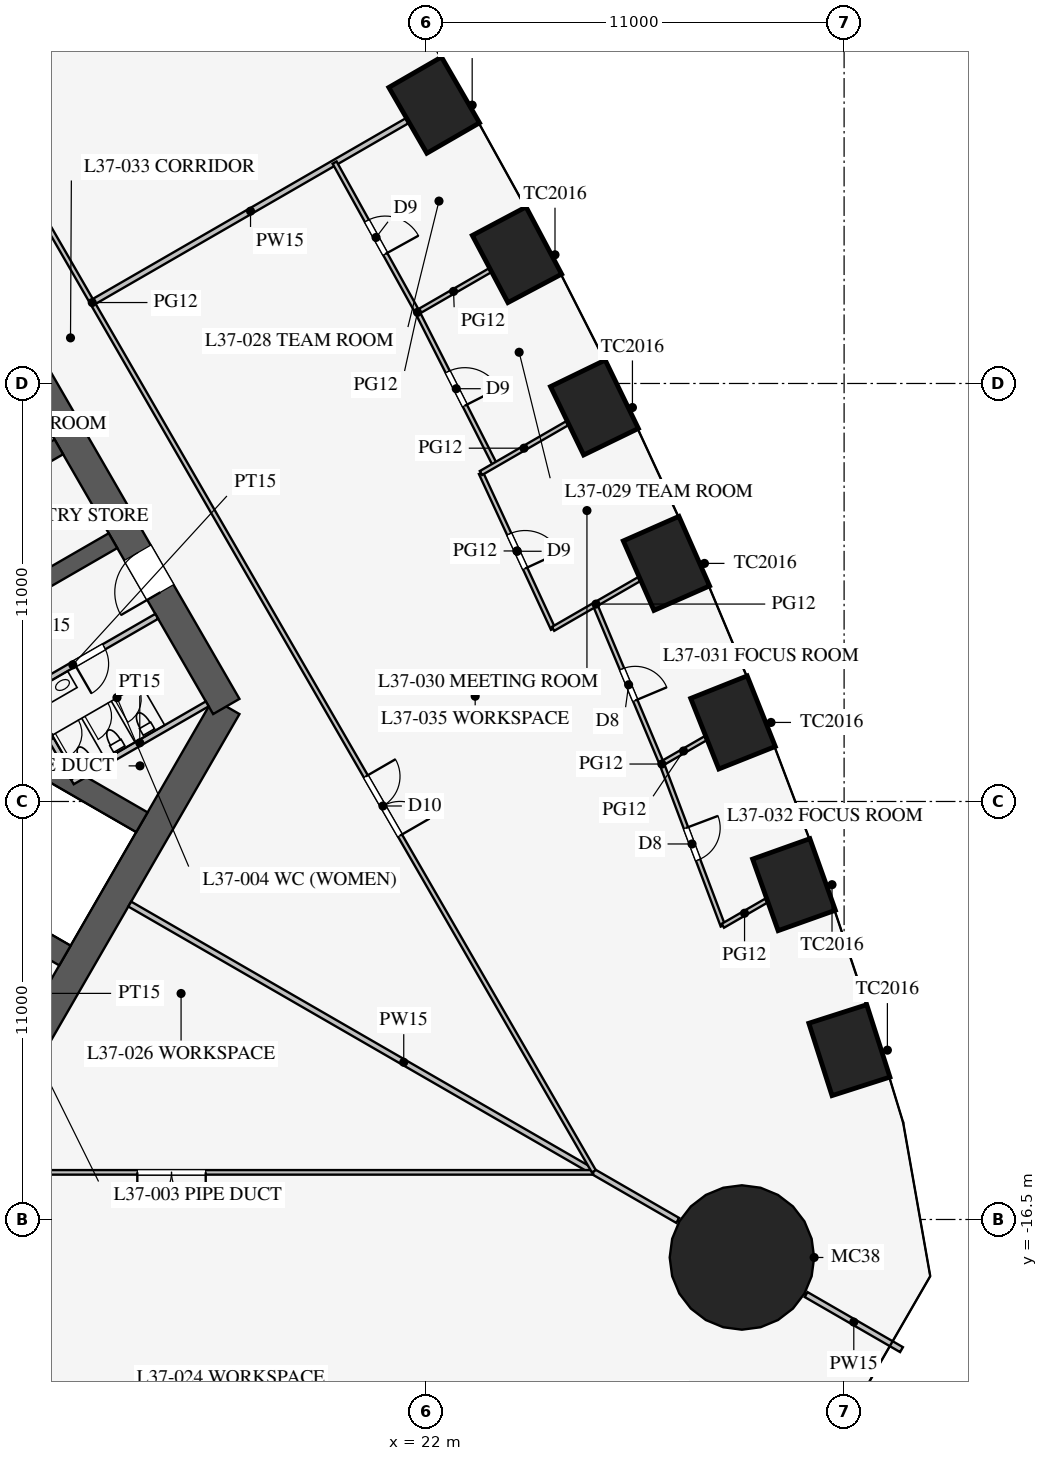
"""IFC4 building model, lengths in metres.
Left out: names, types, materials, properties, quantities, classifications, styles, units other than length and angle.
Written with IfcOpenShell. Run it as: python <this file> out.ifc"""

import sys

from ifc_helpers import new_model, si_unit, direction, frame, frame_2d, origin, origin_2d, place, context, subcontext, project, spatial, rectangle, circle, extrude, element, fill, save


model = new_model("IFC4")
c1 = context("Model", 3, precision=1e-05, world=origin(), true_north=direction((0.0, 1.0)))
c2 = subcontext(c1, "Body", "Model", "MODEL_VIEW")
j1 = project(units=[si_unit("LENGTHUNIT", "METRE"), si_unit("PLANEANGLEUNIT", "RADIAN")], contexts=[c1])
p1 = place(None, origin())
s1 = spatial("IfcSite", under=j1, at=p1, CompositionType="ELEMENT")
p2 = place(p1, origin())
s2 = spatial("IfcBuilding", under=s1, at=p2, CompositionType="ELEMENT")
p3 = place(p2, frame((0.0, 0.0, 161.9)))
s3 = spatial("IfcBuildingStorey", under=s2, at=p3, CompositionType="ELEMENT", Elevation=161.9)
for number, where, z_axis, x_axis in (
    (1, (33.139, -12.044, 0.0), (0.0, 0.0, 1.0), (-0.305, 0.952, 0.0)),
    (2, (31.682, -7.689, 0.0), (0.0, 0.0, 1.0), (-0.336, 0.942, 0.0)),
    (3, (30.077, -3.42, 0.0), (0.0, 0.0, 1.0), (-0.37, 0.929, 0.0)),
    (4, (28.325, 0.765, 0.0), (0.0, 0.0, 1.0), (-0.403, 0.915, 0.0)),
    (5, (26.43, 4.867, 0.0), (0.0, 0.0, 1.0), (-0.436, 0.9, 0.0)),
    (6, (24.393, 8.887, 0.0), (0.0, 0.0, 1.0), (-0.468, 0.883, 0.0)),
    (7, (22.213, 12.825, 0.0), (0.0, 0.0, 1.0), (-0.5, 0.866, 0.0)),
):
    element("IfcColumn", number, at=place(p3, frame(where, z_axis=z_axis, x_axis=x_axis)), inside=s3, PredefinedType="COLUMN", context=c2, shape_type="SweptSolid", body=[
        extrude(rectangle(XDim=2.0, YDim=1.6, at=origin_2d()), origin(), (0.0, 0.0, 1.0), 4.2),
    ])
p4 = place(p3, frame((30.311, -17.5, 0.0), z_axis=(0.0, 0.0, 1.0), x_axis=(1.0, 0.0, 0.0)))
e8 = element("IfcColumn", 8, at=p4, inside=s3, PredefinedType="COLUMN", context=c2, shape_type="SweptSolid", body=[
    extrude(circle(Radius=1.9, at=origin_2d()), origin(), (0.0, 0.0, 1.0), 4.2),
])
p5 = place(p3, frame((10.97, -13.0, 0.0), z_axis=(0.0, 0.0, 1.0), x_axis=(0.499995765644, 0.866027848477, 0.0)))
e9 = element("IfcWall", 9, at=p5, inside=s3, PredefinedType="SHEAR", context=c2, shape_type="SweptSolid", body=[
    extrude(rectangle(XDim=11.547, YDim=0.8, at=frame_2d((5.773, 0.0))), origin(), (0.0, 0.0, 1.0), 4.2),
])
p6 = place(p3, frame((16.743, -3.0, 0.0), z_axis=(0.0, 0.0, 1.0), x_axis=(-0.500002442456, 0.866023993627, 0.0)))
e10 = element("IfcWall", 10, at=p6, inside=s3, PredefinedType="SHEAR", context=c2, shape_type="SweptSolid", body=[
    extrude(rectangle(XDim=21.939, YDim=0.8, at=frame_2d((10.97, 0.0))), origin(), (0.0, 0.0, 1.0), 4.2),
])
p7 = place(p6, frame((17.27, 0.0, 0.0)))
e11 = element("IfcOpeningElement", 11, at=p7, cuts=e10, PredefinedType="OPENING", context=c2, shape_type="SweptSolid", body=[
    extrude(rectangle(XDim=1.2, YDim=2.1, at=frame_2d((0.6, 1.05))), frame((0.0, 0.41, 0.0), z_axis=(0.0, -1.0, 0.0), x_axis=(1.0, 0.0, 0.0)), (0.0, 0.0, 1.0), 0.82),
])
p8 = place(p6, frame((3.47, 0.0, 0.0)))
e12 = element("IfcOpeningElement", 12, at=p8, cuts=e10, PredefinedType="OPENING", context=c2, shape_type="SweptSolid", body=[
    extrude(rectangle(XDim=1.2, YDim=2.1, at=frame_2d((0.6, 1.05))), frame((0.0, 0.41, 0.0), z_axis=(0.0, -1.0, 0.0), x_axis=(1.0, 0.0, 0.0)), (0.0, 0.0, 1.0), 0.82),
])
for number, where, z_axis, x_axis in (
    (13, (11.532, 0.076, 0.0), (0.0, 0.0, 1.0), (0.866, 0.5, 0.0)),
    (14, (10.107, 2.544, 0.0), (0.0, 0.0, 1.0), (0.866, 0.5, 0.0)),
):
    element("IfcWall", number, at=place(p3, frame(where, z_axis=z_axis, x_axis=x_axis)), inside=s3, PredefinedType="SHEAR", context=c2, shape_type="SweptSolid", body=[
        extrude(rectangle(XDim=2.575, YDim=0.45, at=frame_2d((1.288, 0.0))), origin(), (0.0, 0.0, 1.0), 4.2),
    ])
for number, where, z_axis, x_axis in (
    (15, (4.638, -5.016, 0.0), (0.0, 0.0, 1.0), (0.866, -0.5, 0.0)),
    (16, (6.663, -1.509, 0.0), (0.0, 0.0, 1.0), (0.866, -0.5, 0.0)),
):
    element("IfcWall", number, at=place(p3, frame(where, z_axis=z_axis, x_axis=x_axis)), inside=s3, PredefinedType="SHEAR", context=c2, shape_type="SweptSolid", body=[
        extrude(rectangle(XDim=9.075, YDim=0.6, at=frame_2d((4.538, 0.0))), origin(), (0.0, 0.0, 1.0), 4.2),
    ])
p9 = place(p3, frame((10.495, -3.178, 0.0), z_axis=(0.0, 0.0, 1.0), x_axis=(0.86602216432, 0.500005610874, 0.0)))
e17 = element("IfcWall", 17, at=p9, inside=s3, PredefinedType="PARTITIONING", context=c2, shape_type="SweptSolid", body=[
    extrude(rectangle(XDim=5.1, YDim=0.15, at=frame_2d((2.55, 0.0))), origin(), (0.0, 0.0, 1.0), 4.0),
])
p10 = place(p9, frame((2.6, 0.0, 0.0)))
e18 = element("IfcOpeningElement", 18, at=p10, cuts=e17, PredefinedType="OPENING", context=c2, shape_type="SweptSolid", body=[
    extrude(rectangle(XDim=0.9, YDim=2.1, at=frame_2d((0.45, 1.05))), frame((0.0, 0.085, 0.0), z_axis=(0.0, -1.0, 0.0), x_axis=(1.0, 0.0, 0.0)), (0.0, 0.0, 1.0), 0.17),
])
p11 = place(p3, frame((12.691, -4.982, 0.0), z_axis=(0.0, 0.0, 1.0), x_axis=(0.8660249478, 0.500000789788, 0.0)))
e19 = element("IfcWall", 19, at=p11, inside=s3, PredefinedType="PARTITIONING", context=c2, shape_type="SweptSolid", body=[
    extrude(rectangle(XDim=4.1, YDim=0.15, at=frame_2d((2.05, 0.0))), origin(), (0.0, 0.0, 1.0), 4.0),
])
p12 = place(p3, frame((11.464, -2.706, 0.0), z_axis=(0.0, 0.0, 1.0), x_axis=(0.50001992892, -0.866013897511, 0.0)))
e20 = element("IfcWall", 20, at=p12, inside=s3, PredefinedType="PARTITIONING", context=c2, shape_type="SweptSolid", body=[
    extrude(rectangle(XDim=2.51, YDim=0.15, at=frame_2d((1.255, 0.0))), origin(), (0.0, 0.0, 1.0), 4.0),
])
p13 = place(p3, frame((14.203, -8.2, 0.0), z_axis=(0.0, 0.0, 1.0), x_axis=(0.866024668836, -0.500001272966, 0.0)))
e21 = element("IfcWall", 21, at=p13, inside=s3, PredefinedType="PARTITIONING", context=c2, shape_type="SweptSolid", body=[
    extrude(rectangle(XDim=16.65, YDim=0.15, at=frame_2d((8.325, 0.0))), origin(), (0.0, 0.0, 1.0), 2.3),
])
p14 = place(p3, frame((32.0, -18.475, 0.0), z_axis=(0.0, 0.0, 1.0), x_axis=(0.866042548026, -0.499970304126, 0.0)))
e22 = element("IfcWall", 22, at=p14, inside=s3, PredefinedType="PARTITIONING", context=c2, shape_type="SweptSolid", body=[
    extrude(rectangle(XDim=2.899, YDim=0.15, at=frame_2d((1.45, 0.0))), origin(), (0.0, 0.0, 1.0), 2.3),
])
p15 = place(p3, frame((-26.398, -15.26, 0.0), z_axis=(0.0, 0.0, 1.0), x_axis=(1.0, 0.0, 0.0)))
e23 = element("IfcWall", 23, at=p15, inside=s3, PredefinedType="PARTITIONING", context=c2, shape_type="SweptSolid", body=[
    extrude(rectangle(XDim=52.796, YDim=0.12, at=frame_2d((26.398, 0.0))), origin(), (0.0, 0.0, 1.0), 2.9),
])
p16 = place(p15, frame((10.2, 0.0, 0.15)))
e24 = element("IfcOpeningElement", 24, at=p16, cuts=e23, PredefinedType="OPENING", context=c2, shape_type="SweptSolid", body=[
    extrude(rectangle(XDim=1.8, YDim=2.1, at=frame_2d((0.9, 1.05))), frame((0.0, 0.07, 0.0), z_axis=(0.0, -1.0, 0.0), x_axis=(1.0, 0.0, 0.0)), (0.0, 0.0, 1.0), 0.14),
])
p17 = place(p15, frame((40.8, 0.0, 0.15)))
e25 = element("IfcOpeningElement", 25, at=p17, cuts=e23, PredefinedType="OPENING", context=c2, shape_type="SweptSolid", body=[
    extrude(rectangle(XDim=1.8, YDim=2.1, at=frame_2d((0.9, 1.05))), frame((0.0, 0.07, 0.0), z_axis=(0.0, -1.0, 0.0), x_axis=(1.0, 0.0, 0.0)), (0.0, 0.0, 1.0), 0.14),
])
p18 = place(p3, frame((13.268, 7.66, 0.0), z_axis=(0.0, 0.0, 1.0), x_axis=(0.866013963754, 0.500019814191, 0.0)))
e26 = element("IfcWall", 26, at=p18, inside=s3, PredefinedType="PARTITIONING", context=c2, shape_type="SweptSolid", body=[
    extrude(rectangle(XDim=9.5, YDim=0.15, at=frame_2d((4.75, 0.0))), origin(), (0.0, 0.0, 1.0), 2.8),
])
p19 = place(p3, frame((26.415, -15.231, 0.0), z_axis=(0.0, 0.0, 1.0), x_axis=(-0.50000091641, 0.866024874695, 0.0)))
e27 = element("IfcWall", 27, at=p19, inside=s3, PredefinedType="PARTITIONING", context=c2, shape_type="SweptSolid", body=[
    extrude(rectangle(XDim=52.796, YDim=0.12, at=frame_2d((26.398, 0.0))), origin(), (0.0, 0.0, 1.0), 2.9),
])
p20 = place(p19, frame((10.2, 0.0, 0.15)))
e28 = element("IfcOpeningElement", 28, at=p20, cuts=e27, PredefinedType="OPENING", context=c2, shape_type="SweptSolid", body=[
    extrude(rectangle(XDim=1.8, YDim=2.1, at=frame_2d((0.9, 1.05))), frame((0.0, 0.07, 0.0), z_axis=(0.0, -1.0, 0.0), x_axis=(1.0, 0.0, 0.0)), (0.0, 0.0, 1.0), 0.14),
])
p21 = place(p19, frame((40.8, 0.0, 0.15)))
e29 = element("IfcOpeningElement", 29, at=p21, cuts=e27, PredefinedType="OPENING", context=c2, shape_type="SweptSolid", body=[
    extrude(rectangle(XDim=1.8, YDim=2.1, at=frame_2d((0.9, 1.05))), frame((0.0, 0.07, 0.0), z_axis=(0.0, -1.0, 0.0), x_axis=(1.0, 0.0, 0.0)), (0.0, 0.0, 1.0), 0.14),
])
p22 = place(p3, frame((25.342, -0.958, 0.0), z_axis=(0.0, 0.0, 1.0), x_axis=(-0.419883773418, 0.907577884713, 0.0)))
e30 = element("IfcWall", 30, at=p22, inside=s3, PredefinedType="PARTITIONING", context=c2, shape_type="SweptSolid", body=[
    extrude(rectangle(XDim=4.519, YDim=0.12, at=frame_2d((2.259, 0.0))), origin(), (0.0, 0.0, 1.0), 2.9),
])
p23 = place(p22, frame((1.75, 0.0, 0.15)))
e31 = element("IfcOpeningElement", 31, at=p23, cuts=e30, PredefinedType="OPENING", context=c2, shape_type="SweptSolid", body=[
    extrude(rectangle(XDim=1.0, YDim=2.1, at=frame_2d((0.5, 1.05))), frame((0.0, 0.07, 0.0), z_axis=(0.0, -1.0, 0.0), x_axis=(1.0, 0.0, 0.0)), (0.0, 0.0, 1.0), 0.14),
])
p24 = place(p3, frame((28.2, -4.503, 0.0), z_axis=(0.0, 0.0, 1.0), x_axis=(-0.386742917128, 0.92218757097, 0.0)))
e32 = element("IfcWall", 32, at=p24, inside=s3, PredefinedType="PARTITIONING", context=c2, shape_type="SweptSolid", body=[
    extrude(rectangle(XDim=4.536, YDim=0.12, at=frame_2d((2.268, 0.0))), origin(), (0.0, 0.0, 1.0), 2.9),
])
p25 = place(p24, frame((1.8, 0.0, 0.15)))
e33 = element("IfcOpeningElement", 33, at=p25, cuts=e32, PredefinedType="OPENING", context=c2, shape_type="SweptSolid", body=[
    extrude(rectangle(XDim=0.9, YDim=2.1, at=frame_2d((0.45, 1.05))), frame((0.0, 0.07, 0.0), z_axis=(0.0, -1.0, 0.0), x_axis=(1.0, 0.0, 0.0)), (0.0, 0.0, 1.0), 0.14),
])
p26 = place(p3, frame((29.81, -8.77, 0.0), z_axis=(0.0, 0.0, 1.0), x_axis=(-0.35295910498, 0.935638749845, 0.0)))
e34 = element("IfcWall", 34, at=p26, inside=s3, PredefinedType="PARTITIONING", context=c2, shape_type="SweptSolid", body=[
    extrude(rectangle(XDim=4.56, YDim=0.12, at=frame_2d((2.28, 0.0))), origin(), (0.0, 0.0, 1.0), 2.9),
])
p27 = place(p26, frame((1.85, 0.0, 0.15)))
e35 = element("IfcOpeningElement", 35, at=p27, cuts=e34, PredefinedType="OPENING", context=c2, shape_type="SweptSolid", body=[
    extrude(rectangle(XDim=0.9, YDim=2.1, at=frame_2d((0.45, 1.05))), frame((0.0, 0.07, 0.0), z_axis=(0.0, -1.0, 0.0), x_axis=(1.0, 0.0, 0.0)), (0.0, 0.0, 1.0), 0.14),
])
p28 = place(p3, frame((21.773, 7.375, 0.0), z_axis=(0.0, 0.0, 1.0), x_axis=(-0.484315883017, 0.87489320803, 0.0)))
e36 = element("IfcWall", 36, at=p28, inside=s3, PredefinedType="PARTITIONING", context=c2, shape_type="SweptSolid", body=[
    extrude(rectangle(XDim=4.5, YDim=0.12, at=frame_2d((2.25, 0.0))), origin(), (0.0, 0.0, 1.0), 2.9),
])
p29 = place(p28, frame((1.75, 0.0, 0.15)))
e37 = element("IfcOpeningElement", 37, at=p29, cuts=e36, PredefinedType="OPENING", context=c2, shape_type="SweptSolid", body=[
    extrude(rectangle(XDim=1.0, YDim=2.1, at=frame_2d((0.5, 1.05))), frame((0.0, 0.07, 0.0), z_axis=(0.0, -1.0, 0.0), x_axis=(1.0, 0.0, 0.0)), (0.0, 0.0, 1.0), 0.14),
])
p30 = place(p3, frame((23.812, 3.356, 0.0), z_axis=(0.0, 0.0, 1.0), x_axis=(-0.452449820092, 0.891789863308, 0.0)))
e38 = element("IfcWall", 38, at=p30, inside=s3, PredefinedType="PARTITIONING", context=c2, shape_type="SweptSolid", body=[
    extrude(rectangle(XDim=4.507, YDim=0.12, at=frame_2d((2.253, 0.0))), origin(), (0.0, 0.0, 1.0), 2.9),
])
p31 = place(p30, frame((1.75, 0.0, 0.15)))
e39 = element("IfcOpeningElement", 39, at=p31, cuts=e38, PredefinedType="OPENING", context=c2, shape_type="SweptSolid", body=[
    extrude(rectangle(XDim=1.0, YDim=2.1, at=frame_2d((0.5, 1.05))), frame((0.0, 0.07, 0.0), z_axis=(0.0, -1.0, 0.0), x_axis=(1.0, 0.0, 0.0)), (0.0, 0.0, 1.0), 0.14),
])
p32 = place(p3, frame((25.342, -0.958, 0.0), z_axis=(0.0, 0.0, 1.0), x_axis=(0.866036074319, 0.499981517636, 0.0)))
e40 = element("IfcWall", 40, at=p32, inside=s3, PredefinedType="PARTITIONING", context=c2, shape_type="SweptSolid", body=[
    extrude(rectangle(XDim=2.61, YDim=0.12, at=frame_2d((1.305, 0.0))), origin(), (0.0, 0.0, 1.0), 2.6),
])
p33 = place(p3, frame((28.2, -4.503, 0.0), z_axis=(0.0, 0.0, 1.0), x_axis=(0.866017214255, 0.500014184414, 0.0)))
e41 = element("IfcWall", 41, at=p33, inside=s3, PredefinedType="PARTITIONING", context=c2, shape_type="SweptSolid", body=[
    extrude(rectangle(XDim=1.328, YDim=0.12, at=frame_2d((0.664, 0.0))), origin(), (0.0, 0.0, 1.0), 2.8),
])
p34 = place(p3, frame((29.81, -8.77, 0.0), z_axis=(0.0, 0.0, 1.0), x_axis=(0.86603442848, 0.499984368442, 0.0)))
e42 = element("IfcWall", 42, at=p34, inside=s3, PredefinedType="PARTITIONING", context=c2, shape_type="SweptSolid", body=[
    extrude(rectangle(XDim=1.318, YDim=0.12, at=frame_2d((0.659, 0.0))), origin(), (0.0, 0.0, 1.0), 2.9),
])
p35 = place(p3, frame((21.773, 7.375, 0.0), z_axis=(0.0, 0.0, 1.0), x_axis=(0.866050320478, 0.499956840538, 0.0)))
e43 = element("IfcWall", 43, at=p35, inside=s3, PredefinedType="PARTITIONING", context=c2, shape_type="SweptSolid", body=[
    extrude(rectangle(XDim=2.194, YDim=0.12, at=frame_2d((1.097, 0.0))), origin(), (0.0, 0.0, 1.0), 2.8),
])
p36 = place(p3, frame((23.444, 3.143, 0.0), z_axis=(0.0, 0.0, 1.0), x_axis=(0.866011491631, 0.500024095782, 0.0)))
e44 = element("IfcWall", 44, at=p36, inside=s3, PredefinedType="PARTITIONING", context=c2, shape_type="SweptSolid", body=[
    extrude(rectangle(XDim=2.615, YDim=0.12, at=frame_2d((1.308, 0.0))), origin(), (0.0, 0.0, 1.0), 2.9),
])
p37 = place(p10, frame((0.9, 0.0, 0.0), z_axis=(0.0, 0.0, 1.0), x_axis=(-1.0, 0.0, 0.0)))
e45 = element("IfcDoor", 45, at=p37, inside=s3, OperationType="SINGLE_SWING_RIGHT", PredefinedType="DOOR", context=c2, shape_type="SweptSolid", body=[
    extrude(rectangle(XDim=0.9, YDim=2.1, at=frame_2d((0.45, 1.05))), frame((0.0, 0.025, 0.0), z_axis=(0.0, -1.0, 0.0), x_axis=(1.0, 0.0, 0.0)), (0.0, 0.0, 1.0), 0.05),
])
fill(e18, e45)
p38 = place(p8, origin())
e46 = element("IfcDoor", 46, at=p38, inside=s3, OperationType="SINGLE_SWING_LEFT", PredefinedType="DOOR", context=c2, shape_type="SweptSolid", body=[
    extrude(rectangle(XDim=1.2, YDim=2.1, at=frame_2d((0.6, 1.05))), frame((0.0, 0.025, 0.0), z_axis=(0.0, -1.0, 0.0), x_axis=(1.0, 0.0, 0.0)), (0.0, 0.0, 1.0), 0.05),
])
fill(e12, e46)
p39 = place(p17, frame((1.8, 0.0, 0.0), z_axis=(0.0, 0.0, 1.0), x_axis=(-1.0, 0.0, 0.0)))
e47 = element("IfcDoor", 47, at=p39, inside=s3, OperationType="DOUBLE_DOOR_SINGLE_SWING", PredefinedType="DOOR", context=c2, shape_type="SweptSolid", body=[
    extrude(rectangle(XDim=1.8, YDim=2.1, at=frame_2d((0.9, 1.05))), frame((0.0, 0.025, 0.0), z_axis=(0.0, -1.0, 0.0), x_axis=(1.0, 0.0, 0.0)), (0.0, 0.0, 1.0), 0.05),
])
fill(e25, e47)
p40 = place(p29, frame((1.0, 0.0, 0.0), z_axis=(0.0, 0.0, 1.0), x_axis=(-1.0, 0.0, 0.0)))
e48 = element("IfcDoor", 48, at=p40, inside=s3, OperationType="SINGLE_SWING_RIGHT", PredefinedType="DOOR", context=c2, shape_type="SweptSolid", body=[
    extrude(rectangle(XDim=1.0, YDim=2.1, at=frame_2d((0.5, 1.05))), frame((0.0, 0.025, 0.0), z_axis=(0.0, -1.0, 0.0), x_axis=(1.0, 0.0, 0.0)), (0.0, 0.0, 1.0), 0.05),
])
fill(e37, e48)
p41 = place(p31, frame((1.0, 0.0, 0.0), z_axis=(0.0, 0.0, 1.0), x_axis=(-1.0, 0.0, 0.0)))
e49 = element("IfcDoor", 49, at=p41, inside=s3, OperationType="SINGLE_SWING_RIGHT", PredefinedType="DOOR", context=c2, shape_type="SweptSolid", body=[
    extrude(rectangle(XDim=1.0, YDim=2.1, at=frame_2d((0.5, 1.05))), frame((0.0, 0.025, 0.0), z_axis=(0.0, -1.0, 0.0), x_axis=(1.0, 0.0, 0.0)), (0.0, 0.0, 1.0), 0.05),
])
fill(e39, e49)
p42 = place(p23, frame((1.0, 0.0, 0.0), z_axis=(0.0, 0.0, 1.0), x_axis=(-1.0, 0.0, 0.0)))
e50 = element("IfcDoor", 50, at=p42, inside=s3, OperationType="SINGLE_SWING_RIGHT", PredefinedType="DOOR", context=c2, shape_type="SweptSolid", body=[
    extrude(rectangle(XDim=1.0, YDim=2.1, at=frame_2d((0.5, 1.05))), frame((0.0, 0.025, 0.0), z_axis=(0.0, -1.0, 0.0), x_axis=(1.0, 0.0, 0.0)), (0.0, 0.0, 1.0), 0.05),
])
fill(e31, e50)
p43 = place(p25, frame((0.9, 0.0, 0.0), z_axis=(0.0, 0.0, 1.0), x_axis=(-1.0, 0.0, 0.0)))
e51 = element("IfcDoor", 51, at=p43, inside=s3, OperationType="SINGLE_SWING_RIGHT", PredefinedType="DOOR", context=c2, shape_type="SweptSolid", body=[
    extrude(rectangle(XDim=0.9, YDim=2.1, at=frame_2d((0.45, 1.05))), frame((0.0, 0.025, 0.0), z_axis=(0.0, -1.0, 0.0), x_axis=(1.0, 0.0, 0.0)), (0.0, 0.0, 1.0), 0.05),
])
fill(e33, e51)
p44 = place(p27, frame((0.9, 0.0, 0.0), z_axis=(0.0, 0.0, 1.0), x_axis=(-1.0, 0.0, 0.0)))
e52 = element("IfcDoor", 52, at=p44, inside=s3, OperationType="SINGLE_SWING_LEFT", PredefinedType="DOOR", context=c2, shape_type="SweptSolid", body=[
    extrude(rectangle(XDim=0.9, YDim=2.1, at=frame_2d((0.45, 1.05))), frame((0.0, 0.025, 0.0), z_axis=(0.0, -1.0, 0.0), x_axis=(1.0, 0.0, 0.0)), (0.0, 0.0, 1.0), 0.05),
])
fill(e35, e52)
p45 = place(p20, frame((1.8, 0.0, 0.0), z_axis=(0.0, 0.0, 1.0), x_axis=(-1.0, 0.0, 0.0)))
e53 = element("IfcDoor", 53, at=p45, inside=s3, OperationType="DOUBLE_DOOR_SINGLE_SWING", PredefinedType="DOOR", context=c2, shape_type="SweptSolid", body=[
    extrude(rectangle(XDim=1.8, YDim=2.1, at=frame_2d((0.9, 1.05))), frame((0.0, 0.025, 0.0), z_axis=(0.0, -1.0, 0.0), x_axis=(1.0, 0.0, 0.0)), (0.0, 0.0, 1.0), 0.05),
])
fill(e28, e53)
save(model, sys.argv[1])
